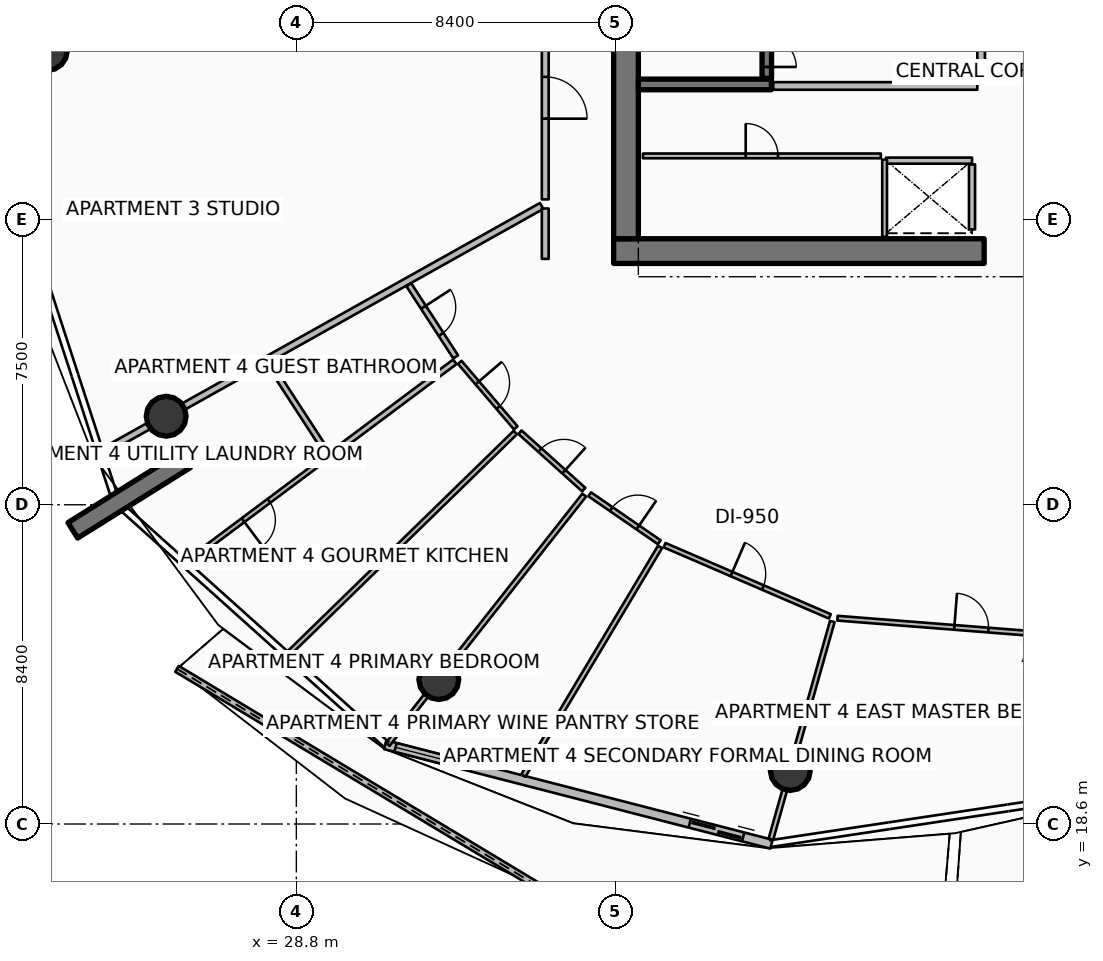
"""IFC4 building model, lengths in metres.
Left out: names, types, materials, properties, quantities, classifications, styles, units other than length and angle.
Written with IfcOpenShell. Run it as: python <this file> out.ifc"""

import sys

from ifc_helpers import new_model, si_unit, direction, frame, frame_2d, origin, origin_2d, place, context, subcontext, project, spatial, polyline, rectangle, circle, outline, extrude, element, fill, save


model = new_model("IFC4")
c1 = context("Model", 3, precision=1e-05, world=origin(), true_north=direction((0.0, 1.0)))
c2 = subcontext(c1, "Body", "Model", "MODEL_VIEW")
j1 = project(units=[si_unit("LENGTHUNIT", "METRE"), si_unit("PLANEANGLEUNIT", "RADIAN")], contexts=[c1])
p1 = place(None, origin())
s1 = spatial("IfcSite", under=j1, at=p1, CompositionType="ELEMENT")
p2 = place(p1, origin())
s2 = spatial("IfcBuilding", under=s1, at=p2, CompositionType="ELEMENT")
p3 = place(p2, frame((0.0, 0.0, 199.05)))
s3 = spatial("IfcBuildingStorey", under=s2, at=p3, CompositionType="ELEMENT", Elevation=199.05)
p4 = place(p3, frame((37.15, 33.675, 0.0), z_axis=(0.0, 0.0, 1.0), x_axis=(1.0, 0.0, 0.0)))
e1 = element("IfcWall", 1, at=p4, inside=s3, PredefinedType="SHEAR", context=c2, shape_type="SweptSolid", body=[
    extrude(rectangle(XDim=9.75, YDim=0.65, at=frame_2d((4.875, 0.0))), origin(), (0.0, 0.0, 1.0), 3.75),
])
p5 = place(p3, frame((37.475, 34.0, 0.0), z_axis=(0.0, 0.0, 1.0), x_axis=(0.0, 1.0, 0.0)))
e2 = element("IfcWall", 2, at=p5, inside=s3, PredefinedType="SHEAR", context=c2, shape_type="SweptSolid", body=[
    extrude(rectangle(XDim=16.0, YDim=0.65, at=frame_2d((8.0, 0.0))), origin(), (0.0, 0.0, 1.0), 3.75),
])
p6 = place(p3, frame((37.8, 38.06, 0.0), z_axis=(0.0, 0.0, 1.0), x_axis=(1.0, 0.0, 0.0)))
e3 = element("IfcWall", 3, at=p6, inside=s3, PredefinedType="SHEAR", context=c2, shape_type="SweptSolid", body=[
    extrude(rectangle(XDim=3.5, YDim=0.28, at=frame_2d((1.75, 0.0))), origin(), (0.0, 0.0, 1.0), 3.75),
])
p7 = place(p3, frame((25.886, 28.182, 0.0), z_axis=(0.0, 0.0, 1.0), x_axis=(-0.848033572426, -0.529942506352, 0.0)))
e4 = element("IfcWall", 4, at=p7, inside=s3, PredefinedType="SOLIDWALL", context=c2, shape_type="SweptSolid", body=[
    extrude(rectangle(XDim=3.5, YDim=0.48, at=frame_2d((1.75, 0.0))), origin(), (0.0, 0.0, 1.0), 3.75),
])
for number, where, z_axis, x_axis in (
    (5, (22.248, 38.952, 0.0), (0.0, 0.0, 1.0), (1.0, 0.0, 0.0)),
    (6, (25.375, 29.329, 0.0), (0.0, 0.0, 1.0), (1.0, 0.0, 0.0)),
    (7, (32.549, 22.401, 0.0), (0.0, 0.0, 1.0), (1.0, 0.0, 0.0)),
    (8, (41.798, 20.008, 0.0), (0.0, 0.0, 1.0), (1.0, 0.0, 0.0)),
):
    element("IfcColumn", number, at=place(p3, frame(where, z_axis=z_axis, x_axis=x_axis)), inside=s3, PredefinedType="COLUMN", context=c2, shape_type="SweptSolid", body=[
        extrude(circle(Radius=0.525, at=origin_2d()), origin(), (0.0, 0.0, 1.0), 3.5),
    ])
p8 = place(p3, frame((25.66, 22.683, 0.0), z_axis=(0.0, 0.0, 1.0), x_axis=(0.856758582714, -0.515717685314, 0.0)))
e9 = element("IfcWall", 9, at=p8, inside=s3, PredefinedType="PARAPET", context=c2, shape_type="SweptSolid", body=[
    extrude(outline(polyline([(0.0, 0.0), (11.043, 0.0), (11.043, 1.348), (5.521, 1.182), (0.0, 1.12), (0.0, 0.0)])), frame((0.0, 0.09, 0.0), z_axis=(0.0, -1.0, 0.0), x_axis=(1.0, 0.0, 0.0)), (0.0, 0.0, 1.0), 0.18),
])
p9 = place(p3, frame((46.107, 15.916, 0.0), z_axis=(0.0, 0.0, 1.0), x_axis=(0.972746941522, 0.231869333374, 0.0)))
e10 = element("IfcWall", 10, at=p9, inside=s3, PredefinedType="PARAPET", context=c2, shape_type="SweptSolid", body=[
    extrude(outline(polyline([(0.0, 0.0), (9.772, 0.0), (9.772, 1.832), (4.886, 1.853), (0.0, 1.756), (0.0, 0.0)])), frame((0.0, 0.09, 0.0), z_axis=(0.0, -1.0, 0.0), x_axis=(1.0, 0.0, 0.0)), (0.0, 0.0, 1.0), 0.18),
])
p10 = place(p3, frame((31.14, 20.687, 0.0), z_axis=(0.0, 0.0, 1.0), x_axis=(0.968374028006, -0.249502989727, 0.0)))
e11 = element("IfcWall", 11, at=p10, inside=s3, PredefinedType="SOLIDWALL", context=c2, shape_type="SweptSolid", body=[
    extrude(rectangle(XDim=10.494, YDim=0.24, at=frame_2d((5.247, 0.0))), origin(), (0.0, 0.0, 1.0), 2.45),
])
p11 = place(p10, frame((8.274, 0.0, 0.0)))
e12 = element("IfcOpeningElement", 12, at=p11, cuts=e11, PredefinedType="OPENING", context=c2, shape_type="SweptSolid", body=[
    extrude(rectangle(XDim=1.45, YDim=2.15, at=frame_2d((0.725, 1.075))), frame((0.0, 0.13, 0.0), z_axis=(0.0, -1.0, 0.0), x_axis=(1.0, 0.0, 0.0)), (0.0, 0.0, 1.0), 0.26),
])
p12 = place(p10, frame((0.28, 0.0, 0.65)))
e13 = element("IfcOpeningElement", 13, at=p12, cuts=e11, PredefinedType="OPENING", context=c2, shape_type="SweptSolid", body=[
    extrude(rectangle(XDim=1.6, YDim=1.5, at=frame_2d((0.8, 0.75))), frame((0.0, 0.13, 0.0), z_axis=(0.0, -1.0, 0.0), x_axis=(1.0, 0.0, 0.0)), (0.0, 0.0, 1.0), 0.26),
])
p13 = place(p3, frame((41.18, 38.22, 0.0), z_axis=(0.0, 0.0, 1.0), x_axis=(0.0, 1.0, 0.0)))
e14 = element("IfcWall", 14, at=p13, inside=s3, PredefinedType="SOLIDWALL", context=c2, shape_type="SweptSolid", body=[
    extrude(rectangle(XDim=7.56, YDim=0.25, at=frame_2d((3.78, 0.0))), origin(), (0.0, 0.0, 1.0), 3.5),
])
p14 = place(p13, frame((0.3, 0.0, 0.0)))
e15 = element("IfcOpeningElement", 15, at=p14, cuts=e14, PredefinedType="OPENING", context=c2, shape_type="SweptSolid", body=[
    extrude(rectangle(XDim=1.55, YDim=2.15, at=frame_2d((0.775, 1.075))), frame((0.0, 0.135, 0.0), z_axis=(0.0, -1.0, 0.0), x_axis=(1.0, 0.0, 0.0)), (0.0, 0.0, 1.0), 0.27),
])
p15 = place(p3, frame((44.32, 36.055, 0.0), z_axis=(0.0, 0.0, 1.0), x_axis=(1.0, 0.0, 0.0)))
e16 = element("IfcWall", 16, at=p15, inside=s3, PredefinedType="PARTITIONING", context=c2, shape_type="SweptSolid", body=[
    extrude(rectangle(XDim=2.26, YDim=0.16, at=frame_2d((1.13, 0.0))), origin(), (0.0, 0.0, 1.0), 3.5),
])
p16 = place(p3, frame((46.58, 34.245, 0.0), z_axis=(0.0, 0.0, 1.0), x_axis=(0.0, 1.0, 0.0)))
e17 = element("IfcWall", 17, at=p16, inside=s3, PredefinedType="PARTITIONING", context=c2, shape_type="SweptSolid", body=[
    extrude(rectangle(XDim=1.71, YDim=0.16, at=frame_2d((0.855, 0.0))), origin(), (0.0, 0.0, 1.0), 3.5),
])
p17 = place(p3, frame((44.28, 34.05, 0.0), z_axis=(0.0, 0.0, 1.0), x_axis=(0.0, 1.0, 0.0)))
e18 = element("IfcWall", 18, at=p17, inside=s3, PredefinedType="PARTITIONING", context=c2, shape_type="SweptSolid", body=[
    extrude(rectangle(XDim=2.03, YDim=0.125, at=frame_2d((1.015, 0.0))), origin(), (0.0, 0.0, 1.0), 2.94),
])
p18 = place(p3, frame((37.92, 36.18, 0.0), z_axis=(0.0, 0.0, 1.0), x_axis=(1.0, 0.0, 0.0)))
e19 = element("IfcWall", 19, at=p18, inside=s3, PredefinedType="PARTITIONING", context=c2, shape_type="SweptSolid", body=[
    extrude(rectangle(XDim=6.26, YDim=0.125, at=frame_2d((3.13, 0.0))), origin(), (0.0, 0.0, 1.0), 2.94),
])
p19 = place(p18, frame((2.705, 0.0, 0.0)))
e20 = element("IfcOpeningElement", 20, at=p19, cuts=e19, PredefinedType="OPENING", context=c2, shape_type="SweptSolid", body=[
    extrude(rectangle(XDim=0.85, YDim=2.06, at=frame_2d((0.425, 1.03))), frame((0.0, 0.073, 0.0), z_axis=(0.0, -1.0, 0.0), x_axis=(1.0, 0.0, 0.0)), (0.0, 0.0, 1.0), 0.145),
])
p20 = place(p3, frame((41.35, 38.02, 0.0), z_axis=(0.0, 0.0, 1.0), x_axis=(1.0, 0.0, 0.0)))
e21 = element("IfcWall", 21, at=p20, inside=s3, PredefinedType="PARTITIONING", context=c2, shape_type="SweptSolid", body=[
    extrude(rectangle(XDim=5.37, YDim=0.2, at=frame_2d((2.685, 0.0))), origin(), (0.0, 0.0, 1.0), 3.5),
])
p21 = place(p3, frame((46.82, 38.12, 0.0), z_axis=(0.0, 0.0, 1.0), x_axis=(0.0, 1.0, 0.0)))
e22 = element("IfcWall", 22, at=p21, inside=s3, PredefinedType="PARTITIONING", context=c2, shape_type="SweptSolid", body=[
    extrude(rectangle(XDim=3.26, YDim=0.2, at=frame_2d((1.63, 0.0))), origin(), (0.0, 0.0, 1.0), 3.5),
])
p22 = place(p21, frame((1.105, 0.0, 0.0)))
e23 = element("IfcOpeningElement", 23, at=p22, cuts=e22, PredefinedType="OPENING", context=c2, shape_type="SweptSolid", body=[
    extrude(rectangle(XDim=1.05, YDim=2.1, at=frame_2d((0.525, 1.05))), frame((0.0, 0.11, 0.0), z_axis=(0.0, -1.0, 0.0), x_axis=(1.0, 0.0, 0.0)), (0.0, 0.0, 1.0), 0.22),
])
p23 = place(p3, frame((35.254, 34.862, 0.0), z_axis=(0.0, 0.0, 1.0), x_axis=(-0.872489721771, -0.488632464541, 0.0)))
e24 = element("IfcWall", 24, at=p23, inside=s3, PredefinedType="PARTITIONING", context=c2, shape_type="SweptSolid", body=[
    extrude(rectangle(XDim=13.286, YDim=0.18, at=frame_2d((6.643, 0.0))), origin(), (0.0, 0.0, 1.0), 2.94),
])
p24 = place(p3, frame((35.35, 40.383, 0.0), z_axis=(0.0, 0.0, 1.0), x_axis=(0.0, -1.0, 0.0)))
e25 = element("IfcWall", 25, at=p24, inside=s3, PredefinedType="PARTITIONING", context=c2, shape_type="SweptSolid", body=[
    extrude(rectangle(XDim=5.347, YDim=0.18, at=frame_2d((2.674, 0.0))), origin(), (0.0, 0.0, 1.0), 2.94),
])
p25 = place(p24, frame((2.124, 0.0, 0.0)))
e26 = element("IfcOpeningElement", 26, at=p25, cuts=e25, PredefinedType="OPENING", context=c2, shape_type="SweptSolid", body=[
    extrude(rectangle(XDim=1.1, YDim=2.1, at=frame_2d((0.55, 1.05))), frame((0.0, 0.1, 0.0), z_axis=(0.0, -1.0, 0.0), x_axis=(1.0, 0.0, 0.0)), (0.0, 0.0, 1.0), 0.2),
])
p26 = place(p3, frame((31.993, 40.105, 0.0), z_axis=(0.0, 0.0, 1.0), x_axis=(-0.993067142816, -0.117548500026, 0.0)))
e27 = element("IfcWall", 27, at=p26, inside=s3, PredefinedType="PARTITIONING", context=c2, shape_type="SweptSolid", body=[
    extrude(rectangle(XDim=11.776, YDim=0.125, at=frame_2d((5.888, 0.0))), origin(), (0.0, 0.0, 1.0), 2.94),
])
p27 = place(p3, frame((35.35, 34.796, 0.0), z_axis=(0.0, 0.0, 1.0), x_axis=(0.0, -1.0, 0.0)))
e28 = element("IfcWall", 28, at=p27, inside=s3, PredefinedType="PARTITIONING", context=c2, shape_type="SweptSolid", body=[
    extrude(rectangle(XDim=1.326, YDim=0.18, at=frame_2d((0.663, 0.0))), origin(), (0.0, 0.0, 1.0), 2.94),
])
p28 = place(p3, frame((31.759, 32.79, 0.0), z_axis=(0.0, 0.0, 1.0), x_axis=(0.544988350595, -0.838443616301, 0.0)))
e29 = element("IfcWall", 29, at=p28, inside=s3, PredefinedType="PARTITIONING", context=c2, shape_type="SweptSolid", body=[
    extrude(rectangle(XDim=2.265, YDim=0.15, at=frame_2d((1.133, 0.0))), origin(), (0.0, 0.0, 1.0), 2.94),
])
p29 = place(p28, frame((0.708, 0.0, 0.0)))
e30 = element("IfcOpeningElement", 30, at=p29, cuts=e29, PredefinedType="OPENING", context=c2, shape_type="SweptSolid", body=[
    extrude(rectangle(XDim=0.85, YDim=2.06, at=frame_2d((0.425, 1.03))), frame((0.0, 0.085, 0.0), z_axis=(0.0, -1.0, 0.0), x_axis=(1.0, 0.0, 0.0)), (0.0, 0.0, 1.0), 0.17),
])
p30 = place(p3, frame((28.077, 30.728, 0.0), z_axis=(0.0, 0.0, 1.0), x_axis=(0.544973135676, -0.838453505802, 0.0)))
e31 = element("IfcWall", 31, at=p30, inside=s3, PredefinedType="PARTITIONING", context=c2, shape_type="SweptSolid", body=[
    extrude(rectangle(XDim=2.82, YDim=0.15, at=frame_2d((1.41, 0.0))), origin(), (0.0, 0.0, 1.0), 2.94),
])
p31 = place(p3, frame((32.97, 30.761, 0.0), z_axis=(0.0, 0.0, 1.0), x_axis=(-0.800880183309, -0.598824625398, 0.0)))
e32 = element("IfcWall", 32, at=p31, inside=s3, PredefinedType="PARTITIONING", context=c2, shape_type="SweptSolid", body=[
    extrude(rectangle(XDim=4.09, YDim=0.15, at=frame_2d((2.045, 0.0))), origin(), (0.0, 0.0, 1.0), 2.94),
])
p32 = place(p3, frame((29.591, 28.234, 0.0), z_axis=(0.0, 0.0, 1.0), x_axis=(-0.80085424852, -0.598859309544, 0.0)))
e33 = element("IfcWall", 33, at=p32, inside=s3, PredefinedType="PARTITIONING", context=c2, shape_type="SweptSolid", body=[
    extrude(rectangle(XDim=4.625, YDim=0.125, at=frame_2d((2.313, 0.0))), origin(), (0.0, 0.0, 1.0), 2.94),
])
p33 = place(p32, frame((1.888, 0.0, 0.0)))
e34 = element("IfcOpeningElement", 34, at=p33, cuts=e33, PredefinedType="OPENING", context=c2, shape_type="SweptSolid", body=[
    extrude(rectangle(XDim=0.85, YDim=2.06, at=frame_2d((0.425, 1.03))), frame((0.0, 0.073, 0.0), z_axis=(0.0, -1.0, 0.0), x_axis=(1.0, 0.0, 0.0)), (0.0, 0.0, 1.0), 0.145),
])
p34 = place(p3, frame((34.562, 28.9, 0.0), z_axis=(0.0, 0.0, 1.0), x_axis=(-0.716077779963, -0.698020496148, 0.0)))
e35 = element("IfcWall", 35, at=p34, inside=s3, PredefinedType="PARTITIONING", context=c2, shape_type="SweptSolid", body=[
    extrude(rectangle(XDim=8.369, YDim=0.125, at=frame_2d((4.185, 0.0))), origin(), (0.0, 0.0, 1.0), 2.94),
])
p35 = place(p3, frame((33.101, 30.747, 0.0), z_axis=(0.0, 0.0, 1.0), x_axis=(0.649815270802, -0.760092174564, 0.0)))
e36 = element("IfcWall", 36, at=p35, inside=s3, PredefinedType="PARTITIONING", context=c2, shape_type="SweptSolid", body=[
    extrude(rectangle(XDim=2.267, YDim=0.125, at=frame_2d((1.134, 0.0))), origin(), (0.0, 0.0, 1.0), 2.94),
])
p36 = place(p35, frame((0.708, 0.0, 0.0)))
e37 = element("IfcOpeningElement", 37, at=p36, cuts=e36, PredefinedType="OPENING", context=c2, shape_type="SweptSolid", body=[
    extrude(rectangle(XDim=0.85, YDim=2.06, at=frame_2d((0.425, 1.03))), frame((0.0, 0.073, 0.0), z_axis=(0.0, -1.0, 0.0), x_axis=(1.0, 0.0, 0.0)), (0.0, 0.0, 1.0), 0.145),
])
p37 = place(p3, frame((34.685, 28.909, 0.0), z_axis=(0.0, 0.0, 1.0), x_axis=(0.74323497862, -0.669030467584, 0.0)))
e38 = element("IfcWall", 38, at=p37, inside=s3, PredefinedType="PARTITIONING", context=c2, shape_type="SweptSolid", body=[
    extrude(rectangle(XDim=2.257, YDim=0.125, at=frame_2d((1.128, 0.0))), origin(), (0.0, 0.0, 1.0), 2.94),
])
p38 = place(p37, frame((0.704, 0.0, 0.0)))
e39 = element("IfcOpeningElement", 39, at=p38, cuts=e38, PredefinedType="OPENING", context=c2, shape_type="SweptSolid", body=[
    extrude(rectangle(XDim=0.85, YDim=2.06, at=frame_2d((0.425, 1.03))), frame((0.0, 0.073, 0.0), z_axis=(0.0, -1.0, 0.0), x_axis=(1.0, 0.0, 0.0)), (0.0, 0.0, 1.0), 0.145),
])
p39 = place(p3, frame((36.375, 27.254, 0.0), z_axis=(0.0, 0.0, 1.0), x_axis=(-0.619083134383, -0.785325456561, 0.0)))
e40 = element("IfcWall", 40, at=p39, inside=s3, PredefinedType="PARTITIONING", context=c2, shape_type="SweptSolid", body=[
    extrude(rectangle(XDim=8.353, YDim=0.125, at=frame_2d((4.177, 0.0))), origin(), (0.0, 0.0, 1.0), 2.94),
])
p40 = place(p3, frame((38.371, 25.892, 0.0), z_axis=(0.0, 0.0, 1.0), x_axis=(-0.513096895206, -0.858330691593, 0.0)))
e41 = element("IfcWall", 41, at=p40, inside=s3, PredefinedType="PARTITIONING", context=c2, shape_type="SweptSolid", body=[
    extrude(rectangle(XDim=7.01, YDim=0.125, at=frame_2d((3.505, 0.0))), origin(), (0.0, 0.0, 1.0), 2.94),
])
p41 = place(p3, frame((36.52, 27.276, 0.0), z_axis=(0.0, 0.0, 1.0), x_axis=(0.823561163257, -0.567227476746, 0.0)))
e42 = element("IfcWall", 42, at=p41, inside=s3, PredefinedType="PARTITIONING", context=c2, shape_type="SweptSolid", body=[
    extrude(rectangle(XDim=2.224, YDim=0.125, at=frame_2d((1.112, 0.0))), origin(), (0.0, 0.0, 1.0), 2.94),
])
p42 = place(p41, frame((0.687, 0.0, 0.0)))
e43 = element("IfcOpeningElement", 43, at=p42, cuts=e42, PredefinedType="OPENING", context=c2, shape_type="SweptSolid", body=[
    extrude(rectangle(XDim=0.85, YDim=2.06, at=frame_2d((0.425, 1.03))), frame((0.0, 0.073, 0.0), z_axis=(0.0, -1.0, 0.0), x_axis=(1.0, 0.0, 0.0)), (0.0, 0.0, 1.0), 0.145),
])
p43 = place(p3, frame((38.49, 25.937, 0.0), z_axis=(0.0, 0.0, 1.0), x_axis=(0.91836706471, -0.39572962292, 0.0)))
e44 = element("IfcWall", 44, at=p43, inside=s3, PredefinedType="PARTITIONING", context=c2, shape_type="SweptSolid", body=[
    extrude(rectangle(XDim=4.734, YDim=0.125, at=frame_2d((2.367, 0.0))), origin(), (0.0, 0.0, 1.0), 2.94),
])
p44 = place(p43, frame((1.917, 0.0, 0.0)))
e45 = element("IfcOpeningElement", 45, at=p44, cuts=e44, PredefinedType="OPENING", context=c2, shape_type="SweptSolid", body=[
    extrude(rectangle(XDim=0.9, YDim=2.08, at=frame_2d((0.45, 1.04))), frame((0.0, 0.073, 0.0), z_axis=(0.0, -1.0, 0.0), x_axis=(1.0, 0.0, 0.0)), (0.0, 0.0, 1.0), 0.145),
])
p45 = place(p3, frame((42.903, 23.928, 0.0), z_axis=(0.0, 0.0, 1.0), x_axis=(-0.2714679616, -0.962447476917, 0.0)))
e46 = element("IfcWall", 46, at=p45, inside=s3, PredefinedType="PARTITIONING", context=c2, shape_type="SweptSolid", body=[
    extrude(rectangle(XDim=5.95, YDim=0.125, at=frame_2d((2.975, 0.0))), origin(), (0.0, 0.0, 1.0), 2.94),
])
p46 = place(p3, frame((43.04, 24.016, 0.0), z_axis=(0.0, 0.0, 1.0), x_axis=(0.996917803484, -0.078453126749, 0.0)))
e47 = element("IfcWall", 47, at=p46, inside=s3, PredefinedType="PARTITIONING", context=c2, shape_type="SweptSolid", body=[
    extrude(rectangle(XDim=7.067, YDim=0.125, at=frame_2d((3.534, 0.0))), origin(), (0.0, 0.0, 1.0), 2.94),
])
p47 = place(p46, frame((3.083, 0.0, 0.0)))
e48 = element("IfcOpeningElement", 48, at=p47, cuts=e47, PredefinedType="OPENING", context=c2, shape_type="SweptSolid", body=[
    extrude(rectangle(XDim=0.9, YDim=2.08, at=frame_2d((0.45, 1.04))), frame((0.0, 0.073, 0.0), z_axis=(0.0, -1.0, 0.0), x_axis=(1.0, 0.0, 0.0)), (0.0, 0.0, 1.0), 0.145),
])
p48 = place(p11, origin())
e49 = element("IfcDoor", 49, at=p48, inside=s3, OperationType="DOUBLE_DOOR_SLIDING", PredefinedType="DOOR", context=c2, shape_type="SweptSolid", body=[
    extrude(rectangle(XDim=1.45, YDim=2.15, at=frame_2d((0.725, 1.075))), frame((0.0, 0.025, 0.0), z_axis=(0.0, -1.0, 0.0), x_axis=(1.0, 0.0, 0.0)), (0.0, 0.0, 1.0), 0.05),
])
fill(e12, e49)
p49 = place(p12, origin())
e50 = element("IfcWindow", 50, at=p49, inside=s3, PartitioningType="SINGLE_PANEL", PredefinedType="WINDOW", context=c2, shape_type="SweptSolid", body=[
    extrude(rectangle(XDim=1.6, YDim=1.5, at=frame_2d((0.8, 0.75))), frame((0.0, 0.03, 0.0), z_axis=(0.0, -1.0, 0.0), x_axis=(1.0, 0.0, 0.0)), (0.0, 0.0, 1.0), 0.06),
])
fill(e13, e50)
p50 = place(p14, origin())
e51 = element("IfcDoor", 51, at=p50, inside=s3, OperationType="DOUBLE_DOOR_SINGLE_SWING", PredefinedType="DOOR", context=c2, shape_type="SweptSolid", body=[
    extrude(rectangle(XDim=1.55, YDim=2.15, at=frame_2d((0.775, 1.075))), frame((0.0, 0.025, 0.0), z_axis=(0.0, -1.0, 0.0), x_axis=(1.0, 0.0, 0.0)), (0.0, 0.0, 1.0), 0.05),
])
fill(e15, e51)
p51 = place(p19, origin())
e52 = element("IfcDoor", 52, at=p51, inside=s3, OperationType="SINGLE_SWING_LEFT", PredefinedType="DOOR", context=c2, shape_type="SweptSolid", body=[
    extrude(rectangle(XDim=0.85, YDim=2.06, at=frame_2d((0.425, 1.03))), frame((0.0, 0.025, 0.0), z_axis=(0.0, -1.0, 0.0), x_axis=(1.0, 0.0, 0.0)), (0.0, 0.0, 1.0), 0.05),
])
fill(e20, e52)
p52 = place(p25, origin())
e53 = element("IfcDoor", 53, at=p52, inside=s3, OperationType="SINGLE_SWING_RIGHT", PredefinedType="DOOR", context=c2, shape_type="SweptSolid", body=[
    extrude(rectangle(XDim=1.1, YDim=2.1, at=frame_2d((0.55, 1.05))), frame((0.0, 0.025, 0.0), z_axis=(0.0, -1.0, 0.0), x_axis=(1.0, 0.0, 0.0)), (0.0, 0.0, 1.0), 0.05),
])
fill(e26, e53)
p53 = place(p29, origin())
e54 = element("IfcDoor", 54, at=p53, inside=s3, OperationType="SINGLE_SWING_LEFT", PredefinedType="DOOR", context=c2, shape_type="SweptSolid", body=[
    extrude(rectangle(XDim=0.85, YDim=2.06, at=frame_2d((0.425, 1.03))), frame((0.0, 0.025, 0.0), z_axis=(0.0, -1.0, 0.0), x_axis=(1.0, 0.0, 0.0)), (0.0, 0.0, 1.0), 0.05),
])
fill(e30, e54)
p54 = place(p33, origin())
e55 = element("IfcDoor", 55, at=p54, inside=s3, OperationType="SINGLE_SWING_RIGHT", PredefinedType="DOOR", context=c2, shape_type="SweptSolid", body=[
    extrude(rectangle(XDim=0.85, YDim=2.06, at=frame_2d((0.425, 1.03))), frame((0.0, 0.025, 0.0), z_axis=(0.0, -1.0, 0.0), x_axis=(1.0, 0.0, 0.0)), (0.0, 0.0, 1.0), 0.05),
])
fill(e34, e55)
p55 = place(p36, origin())
e56 = element("IfcDoor", 56, at=p55, inside=s3, OperationType="SINGLE_SWING_LEFT", PredefinedType="DOOR", context=c2, shape_type="SweptSolid", body=[
    extrude(rectangle(XDim=0.85, YDim=2.06, at=frame_2d((0.425, 1.03))), frame((0.0, 0.025, 0.0), z_axis=(0.0, -1.0, 0.0), x_axis=(1.0, 0.0, 0.0)), (0.0, 0.0, 1.0), 0.05),
])
fill(e37, e56)
p56 = place(p38, origin())
e57 = element("IfcDoor", 57, at=p56, inside=s3, OperationType="SINGLE_SWING_RIGHT", PredefinedType="DOOR", context=c2, shape_type="SweptSolid", body=[
    extrude(rectangle(XDim=0.85, YDim=2.06, at=frame_2d((0.425, 1.03))), frame((0.0, 0.025, 0.0), z_axis=(0.0, -1.0, 0.0), x_axis=(1.0, 0.0, 0.0)), (0.0, 0.0, 1.0), 0.05),
])
fill(e39, e57)
p57 = place(p42, origin())
e58 = element("IfcDoor", 58, at=p57, inside=s3, OperationType="SINGLE_SWING_RIGHT", PredefinedType="DOOR", context=c2, shape_type="SweptSolid", body=[
    extrude(rectangle(XDim=0.85, YDim=2.06, at=frame_2d((0.425, 1.03))), frame((0.0, 0.025, 0.0), z_axis=(0.0, -1.0, 0.0), x_axis=(1.0, 0.0, 0.0)), (0.0, 0.0, 1.0), 0.05),
])
fill(e43, e58)
p58 = place(p44, origin())
e59 = element("IfcDoor", 59, at=p58, inside=s3, OperationType="SINGLE_SWING_LEFT", PredefinedType="DOOR", context=c2, shape_type="SweptSolid", body=[
    extrude(rectangle(XDim=0.9, YDim=2.08, at=frame_2d((0.45, 1.04))), frame((0.0, 0.025, 0.0), z_axis=(0.0, -1.0, 0.0), x_axis=(1.0, 0.0, 0.0)), (0.0, 0.0, 1.0), 0.05),
])
fill(e45, e59)
p59 = place(p47, origin())
e60 = element("IfcDoor", 60, at=p59, inside=s3, OperationType="SINGLE_SWING_LEFT", PredefinedType="DOOR", context=c2, shape_type="SweptSolid", body=[
    extrude(rectangle(XDim=0.9, YDim=2.08, at=frame_2d((0.45, 1.04))), frame((0.0, 0.025, 0.0), z_axis=(0.0, -1.0, 0.0), x_axis=(1.0, 0.0, 0.0)), (0.0, 0.0, 1.0), 0.05),
])
fill(e48, e60)
save(model, sys.argv[1])
